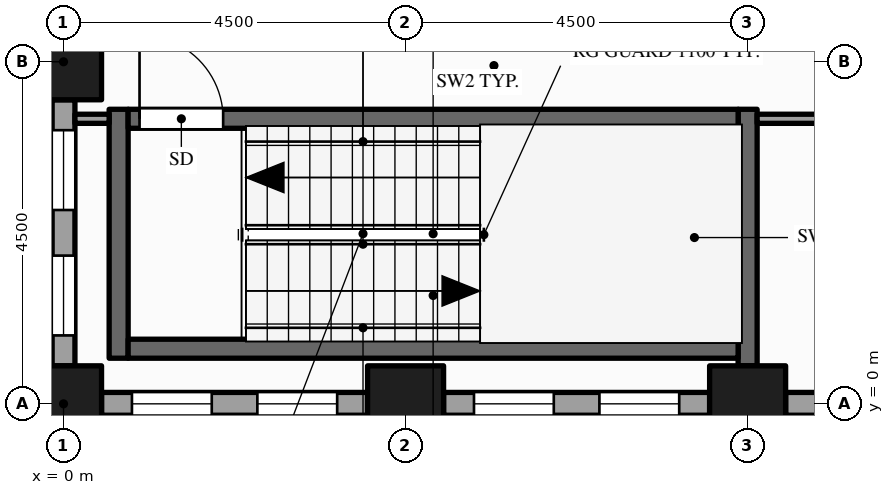
"""IFC4 building model, lengths in metres.
Left out: names, types, materials, properties, quantities, classifications, styles, units other than length and angle.
Written with IfcOpenShell. Run it as: python <this file> out.ifc"""

import sys

from ifc_helpers import new_model, si_unit, direction, frame, frame_2d, origin, origin_2d, place, context, subcontext, project, spatial, rectangle, hollow_rectangle, extrude, element, fill, save


model = new_model("IFC4")
c1 = context("Model", 3, precision=1e-05, world=origin(), true_north=direction((0.0, 1.0)))
c2 = subcontext(c1, "Body", "Model", "MODEL_VIEW")
j1 = project(units=[si_unit("LENGTHUNIT", "METRE"), si_unit("PLANEANGLEUNIT", "RADIAN")], contexts=[c1])
p1 = place(None, origin())
s1 = spatial("IfcSite", under=j1, at=p1, CompositionType="ELEMENT")
p2 = place(p1, origin())
s2 = spatial("IfcBuilding", under=s1, at=p2, CompositionType="ELEMENT")
p3 = place(p2, frame((0.0, 0.0, 95.0)))
s3 = spatial("IfcBuildingStorey", under=s2, at=p3, CompositionType="ELEMENT", Elevation=95.0)
for number, where, z_axis, x_axis in (
    (1, (0.0, 0.0, -0.15), (0.0, 0.0, 1.0), (1.0, 0.0, 0.0)),
    (2, (0.0, 4.5, -0.15), (0.0, 0.0, 1.0), (1.0, 0.0, 0.0)),
    (3, (4.5, 0.0, -0.15), (0.0, 0.0, 1.0), (1.0, 0.0, 0.0)),
    (4, (9.0, 0.0, -0.15), (0.0, 0.0, 1.0), (1.0, 0.0, 0.0)),
):
    element("IfcColumn", number, at=place(p3, frame(where, z_axis=z_axis, x_axis=x_axis)), inside=s3, PredefinedType="COLUMN", context=c2, shape_type="SweptSolid", body=[
        extrude(hollow_rectangle(XDim=1.0, YDim=1.0, WallThickness=0.05, at=origin_2d()), origin(), (0.0, 0.0, 1.0), 4.0),
    ])
p4 = place(p3, frame((0.0, 4.0, 0.0), z_axis=(0.0, 0.0, 1.0), x_axis=(0.0, -1.0, 0.0)))
e5 = element("IfcWall", 5, at=p4, inside=s3, PredefinedType="STANDARD", context=c2, shape_type="SweptSolid", body=[
    extrude(rectangle(XDim=3.5, YDim=0.3, at=frame_2d((1.75, 0.0))), origin(), (0.0, 0.0, 1.0), 3.154),
])
p5 = place(p4, frame((0.4, 0.0, 0.9)))
e6 = element("IfcOpeningElement", 6, at=p5, cuts=e5, PredefinedType="OPENING", context=c2, shape_type="SweptSolid", body=[
    extrude(rectangle(XDim=1.05, YDim=2.0, at=frame_2d((0.525, 1.0))), frame((0.0, 0.16, 0.0), z_axis=(0.0, -1.0, 0.0), x_axis=(1.0, 0.0, 0.0)), (0.0, 0.0, 1.0), 0.32),
])
p6 = place(p4, frame((2.05, 0.0, 0.9)))
e7 = element("IfcOpeningElement", 7, at=p6, cuts=e5, PredefinedType="OPENING", context=c2, shape_type="SweptSolid", body=[
    extrude(rectangle(XDim=1.05, YDim=2.0, at=frame_2d((0.525, 1.0))), frame((0.0, 0.16, 0.0), z_axis=(0.0, -1.0, 0.0), x_axis=(1.0, 0.0, 0.0)), (0.0, 0.0, 1.0), 0.32),
])
p7 = place(p3, frame((0.5, 0.0, 0.0), z_axis=(0.0, 0.0, 1.0), x_axis=(1.0, 0.0, 0.0)))
e8 = element("IfcWall", 8, at=p7, inside=s3, PredefinedType="STANDARD", context=c2, shape_type="SweptSolid", body=[
    extrude(rectangle(XDim=3.5, YDim=0.3, at=frame_2d((1.75, 0.0))), origin(), (0.0, 0.0, 1.0), 3.154),
])
p8 = place(p7, frame((0.4, 0.0, 0.9)))
e9 = element("IfcOpeningElement", 9, at=p8, cuts=e8, PredefinedType="OPENING", context=c2, shape_type="SweptSolid", body=[
    extrude(rectangle(XDim=1.05, YDim=2.0, at=frame_2d((0.525, 1.0))), frame((0.0, 0.16, 0.0), z_axis=(0.0, -1.0, 0.0), x_axis=(1.0, 0.0, 0.0)), (0.0, 0.0, 1.0), 0.32),
])
p9 = place(p7, frame((2.05, 0.0, 0.9)))
e10 = element("IfcOpeningElement", 10, at=p9, cuts=e8, PredefinedType="OPENING", context=c2, shape_type="SweptSolid", body=[
    extrude(rectangle(XDim=1.05, YDim=2.0, at=frame_2d((0.525, 1.0))), frame((0.0, 0.16, 0.0), z_axis=(0.0, -1.0, 0.0), x_axis=(1.0, 0.0, 0.0)), (0.0, 0.0, 1.0), 0.32),
])
p10 = place(p3, frame((5.0, 0.0, 0.0), z_axis=(0.0, 0.0, 1.0), x_axis=(1.0, 0.0, 0.0)))
e11 = element("IfcWall", 11, at=p10, inside=s3, PredefinedType="STANDARD", context=c2, shape_type="SweptSolid", body=[
    extrude(rectangle(XDim=3.5, YDim=0.3, at=frame_2d((1.75, 0.0))), origin(), (0.0, 0.0, 1.0), 3.154),
])
p11 = place(p10, frame((0.4, 0.0, 0.9)))
e12 = element("IfcOpeningElement", 12, at=p11, cuts=e11, PredefinedType="OPENING", context=c2, shape_type="SweptSolid", body=[
    extrude(rectangle(XDim=1.05, YDim=2.0, at=frame_2d((0.525, 1.0))), frame((0.0, 0.16, 0.0), z_axis=(0.0, -1.0, 0.0), x_axis=(1.0, 0.0, 0.0)), (0.0, 0.0, 1.0), 0.32),
])
p12 = place(p10, frame((2.05, 0.0, 0.9)))
e13 = element("IfcOpeningElement", 13, at=p12, cuts=e11, PredefinedType="OPENING", context=c2, shape_type="SweptSolid", body=[
    extrude(rectangle(XDim=1.05, YDim=2.0, at=frame_2d((0.525, 1.0))), frame((0.0, 0.16, 0.0), z_axis=(0.0, -1.0, 0.0), x_axis=(1.0, 0.0, 0.0)), (0.0, 0.0, 1.0), 0.32),
])
p13 = place(p3, frame((9.5, 0.0, 0.0), z_axis=(0.0, 0.0, 1.0), x_axis=(1.0, 0.0, 0.0)))
e14 = element("IfcWall", 14, at=p13, inside=s3, PredefinedType="STANDARD", context=c2, shape_type="SweptSolid", body=[
    extrude(rectangle(XDim=3.5, YDim=0.3, at=frame_2d((1.75, 0.0))), origin(), (0.0, 0.0, 1.0), 3.154),
])
p14 = place(p13, frame((0.4, 0.0, 0.9)))
e15 = element("IfcOpeningElement", 15, at=p14, cuts=e14, PredefinedType="OPENING", context=c2, shape_type="SweptSolid", body=[
    extrude(rectangle(XDim=1.05, YDim=2.0, at=frame_2d((0.525, 1.0))), frame((0.0, 0.16, 0.0), z_axis=(0.0, -1.0, 0.0), x_axis=(1.0, 0.0, 0.0)), (0.0, 0.0, 1.0), 0.32),
])
p15 = place(p13, frame((2.05, 0.0, 0.9)))
e16 = element("IfcOpeningElement", 16, at=p15, cuts=e14, PredefinedType="OPENING", context=c2, shape_type="SweptSolid", body=[
    extrude(rectangle(XDim=1.05, YDim=2.0, at=frame_2d((0.525, 1.0))), frame((0.0, 0.16, 0.0), z_axis=(0.0, -1.0, 0.0), x_axis=(1.0, 0.0, 0.0)), (0.0, 0.0, 1.0), 0.32),
])
p16 = place(p3, frame((0.725, 0.6, 0.0), z_axis=(0.0, 0.0, 1.0), x_axis=(0.0, 1.0, 0.0)))
e17 = element("IfcWall", 17, at=p16, inside=s3, PredefinedType="SHEAR", context=c2, shape_type="SweptSolid", body=[
    extrude(rectangle(XDim=3.275, YDim=0.25, at=frame_2d((1.637, 0.0))), origin(), (0.0, 0.0, 1.0), 3.85),
])
p17 = place(p3, frame((9.0, 0.5, 0.0), z_axis=(0.0, 0.0, 1.0), x_axis=(0.0, 1.0, 0.0)))
e18 = element("IfcWall", 18, at=p17, inside=s3, PredefinedType="SHEAR", context=c2, shape_type="SweptSolid", body=[
    extrude(rectangle(XDim=3.375, YDim=0.25, at=frame_2d((1.688, 0.0))), origin(), (0.0, 0.0, 1.0), 3.85),
])
p18 = place(p3, frame((0.85, 0.725, 0.0), z_axis=(0.0, 0.0, 1.0), x_axis=(1.0, 0.0, 0.0)))
e19 = element("IfcWall", 19, at=p18, inside=s3, PredefinedType="SHEAR", context=c2, shape_type="SweptSolid", body=[
    extrude(rectangle(XDim=8.025, YDim=0.25, at=frame_2d((4.012, 0.0))), origin(), (0.0, 0.0, 1.0), 3.85),
])
p19 = place(p3, frame((0.15, 3.75, 0.0), z_axis=(0.0, 0.0, 1.0), x_axis=(1.0, 0.0, 0.0)))
e20 = element("IfcWall", 20, at=p19, inside=s3, PredefinedType="PARTITIONING", context=c2, shape_type="SweptSolid", body=[
    extrude(rectangle(XDim=0.45, YDim=0.12, at=frame_2d((0.225, 0.0))), origin(), (0.0, 0.0, 1.0), 3.154),
])
p20 = place(p3, frame((0.85, 3.75, 0.0), z_axis=(0.0, 0.0, 1.0), x_axis=(1.0, 0.0, 0.0)))
e21 = element("IfcWall", 21, at=p20, inside=s3, PredefinedType="SHEAR", context=c2, shape_type="SweptSolid", body=[
    extrude(rectangle(XDim=8.025, YDim=0.25, at=frame_2d((4.012, 0.0))), origin(), (0.0, 0.0, 1.0), 3.85),
])
p21 = place(p20, frame((0.15, 0.0, 0.0)))
e22 = element("IfcOpeningElement", 22, at=p21, cuts=e21, PredefinedType="OPENING", context=c2, shape_type="SweptSolid", body=[
    extrude(rectangle(XDim=1.1, YDim=2.1, at=frame_2d((0.55, 1.05))), frame((0.0, 0.135, 0.0), z_axis=(0.0, -1.0, 0.0), x_axis=(1.0, 0.0, 0.0)), (0.0, 0.0, 1.0), 0.27),
])
p22 = place(p3, frame((9.125, 3.75, 0.0), z_axis=(0.0, 0.0, 1.0), x_axis=(1.0, 0.0, 0.0)))
e23 = element("IfcWall", 23, at=p22, inside=s3, PredefinedType="PARTITIONING", context=c2, shape_type="SweptSolid", body=[
    extrude(rectangle(XDim=2.065, YDim=0.12, at=frame_2d((1.032, 0.0))), origin(), (0.0, 0.0, 1.0), 2.938),
])
p23 = place(p5, origin())
e24 = element("IfcWindow", 24, at=p23, inside=s3, PartitioningType="SINGLE_PANEL", PredefinedType="WINDOW", context=c2, shape_type="SweptSolid", body=[
    extrude(rectangle(XDim=1.05, YDim=2.0, at=frame_2d((0.525, 1.0))), frame((0.0, 0.03, 0.0), z_axis=(0.0, -1.0, 0.0), x_axis=(1.0, 0.0, 0.0)), (0.0, 0.0, 1.0), 0.06),
])
fill(e6, e24)
p24 = place(p6, origin())
e25 = element("IfcWindow", 25, at=p24, inside=s3, PartitioningType="SINGLE_PANEL", PredefinedType="WINDOW", context=c2, shape_type="SweptSolid", body=[
    extrude(rectangle(XDim=1.05, YDim=2.0, at=frame_2d((0.525, 1.0))), frame((0.0, 0.03, 0.0), z_axis=(0.0, -1.0, 0.0), x_axis=(1.0, 0.0, 0.0)), (0.0, 0.0, 1.0), 0.06),
])
fill(e7, e25)
p25 = place(p8, origin())
e26 = element("IfcWindow", 26, at=p25, inside=s3, PartitioningType="SINGLE_PANEL", PredefinedType="WINDOW", context=c2, shape_type="SweptSolid", body=[
    extrude(rectangle(XDim=1.05, YDim=2.0, at=frame_2d((0.525, 1.0))), frame((0.0, 0.03, 0.0), z_axis=(0.0, -1.0, 0.0), x_axis=(1.0, 0.0, 0.0)), (0.0, 0.0, 1.0), 0.06),
])
fill(e9, e26)
p26 = place(p9, origin())
e27 = element("IfcWindow", 27, at=p26, inside=s3, PartitioningType="SINGLE_PANEL", PredefinedType="WINDOW", context=c2, shape_type="SweptSolid", body=[
    extrude(rectangle(XDim=1.05, YDim=2.0, at=frame_2d((0.525, 1.0))), frame((0.0, 0.03, 0.0), z_axis=(0.0, -1.0, 0.0), x_axis=(1.0, 0.0, 0.0)), (0.0, 0.0, 1.0), 0.06),
])
fill(e10, e27)
p27 = place(p11, origin())
e28 = element("IfcWindow", 28, at=p27, inside=s3, PartitioningType="SINGLE_PANEL", PredefinedType="WINDOW", context=c2, shape_type="SweptSolid", body=[
    extrude(rectangle(XDim=1.05, YDim=2.0, at=frame_2d((0.525, 1.0))), frame((0.0, 0.03, 0.0), z_axis=(0.0, -1.0, 0.0), x_axis=(1.0, 0.0, 0.0)), (0.0, 0.0, 1.0), 0.06),
])
fill(e12, e28)
p28 = place(p12, origin())
e29 = element("IfcWindow", 29, at=p28, inside=s3, PartitioningType="SINGLE_PANEL", PredefinedType="WINDOW", context=c2, shape_type="SweptSolid", body=[
    extrude(rectangle(XDim=1.05, YDim=2.0, at=frame_2d((0.525, 1.0))), frame((0.0, 0.03, 0.0), z_axis=(0.0, -1.0, 0.0), x_axis=(1.0, 0.0, 0.0)), (0.0, 0.0, 1.0), 0.06),
])
fill(e13, e29)
p29 = place(p21, origin())
e30 = element("IfcDoor", 30, at=p29, inside=s3, OperationType="SINGLE_SWING_LEFT", PredefinedType="DOOR", context=c2, shape_type="SweptSolid", body=[
    extrude(rectangle(XDim=1.1, YDim=2.1, at=frame_2d((0.55, 1.05))), frame((0.0, 0.025, 0.0), z_axis=(0.0, -1.0, 0.0), x_axis=(1.0, 0.0, 0.0)), (0.0, 0.0, 1.0), 0.05),
])
fill(e22, e30)
save(model, sys.argv[1])
